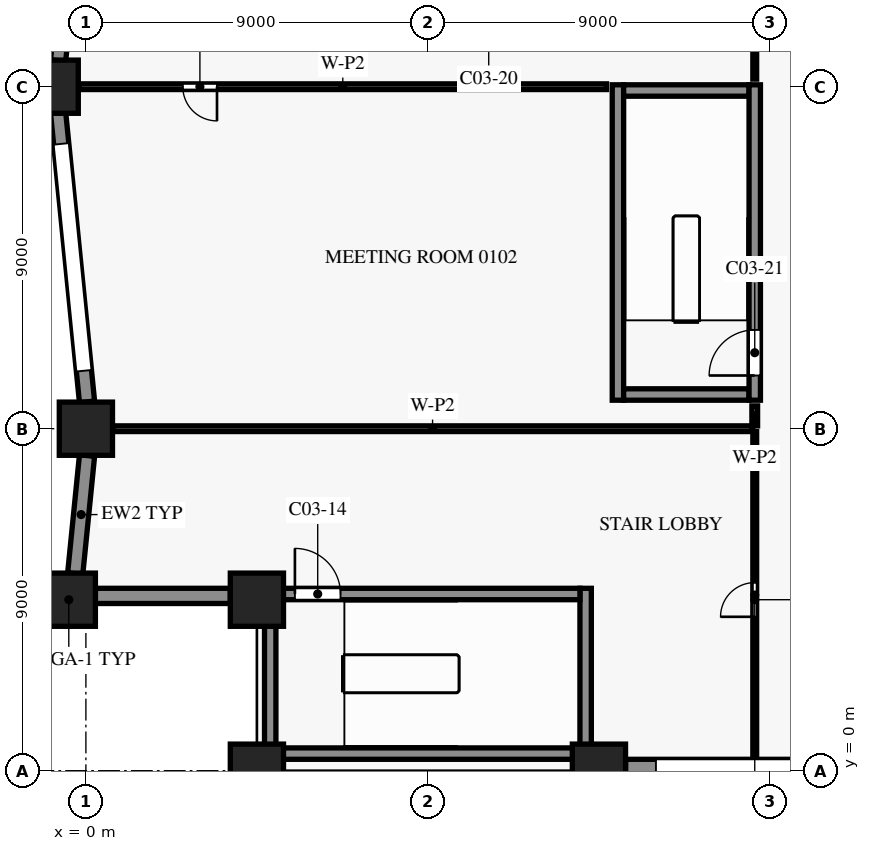
"""IFC4 building model, lengths in metres.
Left out: names, types, materials, properties, quantities, classifications, styles, units other than length and angle.
Written with IfcOpenShell. Run it as: python <this file> out.ifc"""

import sys

from ifc_helpers import new_model, si_unit, direction, frame, frame_2d, origin, origin_2d, place, context, subcontext, project, spatial, rectangle, extrude, element, fill, save


model = new_model("IFC4")
c1 = context("Model", 3, precision=1e-05, world=origin(), true_north=direction((0.0, 1.0)))
c2 = subcontext(c1, "Body", "Model", "MODEL_VIEW")
j1 = project(units=[si_unit("LENGTHUNIT", "METRE"), si_unit("PLANEANGLEUNIT", "RADIAN")], contexts=[c1])
p1 = place(None, origin())
s1 = spatial("IfcSite", under=j1, at=p1, CompositionType="ELEMENT")
p2 = place(p1, origin())
s2 = spatial("IfcBuilding", under=s1, at=p2, CompositionType="ELEMENT")
p3 = place(p2, frame((0.0, 0.0, 7.5)))
s3 = spatial("IfcBuildingStorey", under=s2, at=p3, CompositionType="ELEMENT", Elevation=7.5)
for number, where, z_axis, x_axis in (
    (1, (4.5, 0.0, 0.0), (0.0, 0.0, 1.0), (1.0, 0.0, 0.0)),
    (2, (13.5, 0.0, 0.0), (0.0, 0.0, 1.0), (1.0, 0.0, 0.0)),
    (3, (-0.9, 18.0, 0.0), (0.0, 0.0, 1.0), (1.0, 0.0, 0.0)),
    (4, (0.0, 9.0, 0.0), (0.0, 0.0, 1.0), (1.0, 0.0, 0.0)),
    (5, (-0.45, 4.5, 0.0), (0.0, 0.0, 1.0), (1.0, 0.0, 0.0)),
    (6, (4.5, 4.5, 0.0), (0.0, 0.0, 1.0), (1.0, 0.0, 0.0)),
):
    element("IfcColumn", number, at=place(p3, frame(where, z_axis=z_axis, x_axis=x_axis)), inside=s3, PredefinedType="COLUMN", context=c2, shape_type="SweptSolid", body=[
        extrude(rectangle(XDim=1.4, YDim=1.4, at=origin_2d()), origin(), (0.0, 0.0, 1.0), 7.0),
    ])
p4 = place(p3, frame((21.8, 0.1, 0.0), z_axis=(0.0, 0.0, 1.0), x_axis=(-1.0, 0.0, 0.0)))
e7 = element("IfcWall", 7, at=p4, inside=s3, PredefinedType="SOLIDWALL", context=c2, shape_type="SweptSolid", body=[
    extrude(rectangle(XDim=7.6, YDim=0.4, at=frame_2d((3.8, 0.0))), origin(), (0.0, 0.0, 1.0), 6.1),
])
p5 = place(p4, frame((0.8, 0.0, 0.9)))
e8 = element("IfcOpeningElement", 8, at=p5, cuts=e7, PredefinedType="OPENING", context=c2, shape_type="SweptSolid", body=[
    extrude(rectangle(XDim=6.0, YDim=1.8, at=frame_2d((3.0, 0.9))), frame((0.0, 0.21, 0.0), z_axis=(0.0, -1.0, 0.0), x_axis=(1.0, 0.0, 0.0)), (0.0, 0.0, 1.0), 0.42),
])
p6 = place(p3, frame((-0.731, 18.687, 0.0), z_axis=(0.0, 0.0, 1.0), x_axis=(0.099478423711, 0.995039719416, 0.0)))
e9 = element("IfcWall", 9, at=p6, inside=s3, PredefinedType="SOLIDWALL", context=c2, shape_type="SweptSolid", body=[
    extrude(rectangle(XDim=7.645, YDim=0.4, at=frame_2d((3.822, 0.0))), origin(), (0.0, 0.0, 1.0), 6.1),
])
p7 = place(p6, frame((0.823, 0.0, 0.9)))
e10 = element("IfcOpeningElement", 10, at=p7, cuts=e9, PredefinedType="OPENING", context=c2, shape_type="SweptSolid", body=[
    extrude(rectangle(XDim=6.0, YDim=1.8, at=frame_2d((3.0, 0.9))), frame((0.0, 0.21, 0.0), z_axis=(0.0, -1.0, 0.0), x_axis=(1.0, 0.0, 0.0)), (0.0, 0.0, 1.0), 0.42),
])
p8 = place(p3, frame((0.03, 9.707, 0.0), z_axis=(0.0, 0.0, 1.0), x_axis=(-0.099478423711, 0.995039719416, 0.0)))
e11 = element("IfcWall", 11, at=p8, inside=s3, PredefinedType="SOLIDWALL", context=c2, shape_type="SweptSolid", body=[
    extrude(rectangle(XDim=7.645, YDim=0.4, at=frame_2d((3.822, 0.0))), origin(), (0.0, 0.0, 1.0), 6.1),
])
p9 = place(p8, frame((0.823, 0.0, 0.9)))
e12 = element("IfcOpeningElement", 12, at=p9, cuts=e11, PredefinedType="OPENING", context=c2, shape_type="SweptSolid", body=[
    extrude(rectangle(XDim=6.0, YDim=1.8, at=frame_2d((3.0, 0.9))), frame((0.0, 0.21, 0.0), z_axis=(0.0, -1.0, 0.0), x_axis=(1.0, 0.0, 0.0)), (0.0, 0.0, 1.0), 0.42),
])
p10 = place(p3, frame((-0.281, 5.187, 0.0), z_axis=(0.0, 0.0, 1.0), x_axis=(0.099457269599, 0.995041834057, 0.0)))
e13 = element("IfcWall", 13, at=p10, inside=s3, PredefinedType="SOLIDWALL", context=c2, shape_type="SweptSolid", body=[
    extrude(rectangle(XDim=3.122, YDim=0.4, at=frame_2d((1.561, 0.0))), origin(), (0.0, 0.0, 1.0), 6.1),
])
p11 = place(p3, frame((3.8, 4.6, 0.0), z_axis=(0.0, 0.0, 1.0), x_axis=(-1.0, 0.0, 0.0)))
e14 = element("IfcWall", 14, at=p11, inside=s3, PredefinedType="SOLIDWALL", context=c2, shape_type="SweptSolid", body=[
    extrude(rectangle(XDim=3.55, YDim=0.4, at=frame_2d((1.775, 0.0))), origin(), (0.0, 0.0, 1.0), 6.1),
])
p12 = place(p3, frame((5.0, 0.45, 0.0), z_axis=(0.0, 0.0, 1.0), x_axis=(1.0, 0.0, 0.0)))
e15 = element("IfcWall", 15, at=p12, inside=s3, PredefinedType="SHEAR", context=c2, shape_type="SweptSolid", body=[
    extrude(rectangle(XDim=8.0, YDim=0.3, at=frame_2d((4.0, 0.0))), origin(), (0.0, 0.0, 1.0), 6.7),
])
p13 = place(p3, frame((5.0, 4.65, 0.0), z_axis=(0.0, 0.0, 1.0), x_axis=(1.0, 0.0, 0.0)))
e16 = element("IfcWall", 16, at=p13, inside=s3, PredefinedType="SHEAR", context=c2, shape_type="SweptSolid", body=[
    extrude(rectangle(XDim=8.0, YDim=0.3, at=frame_2d((4.0, 0.0))), origin(), (0.0, 0.0, 1.0), 6.7),
])
p14 = place(p13, frame((0.5, 0.0, 0.0)))
e17 = element("IfcOpeningElement", 17, at=p14, cuts=e16, PredefinedType="OPENING", context=c2, shape_type="SweptSolid", body=[
    extrude(rectangle(XDim=1.2, YDim=2.2, at=frame_2d((0.6, 1.1))), frame((0.0, 0.16, 0.0), z_axis=(0.0, -1.0, 0.0), x_axis=(1.0, 0.0, 0.0)), (0.0, 0.0, 1.0), 0.32),
])
for number, where, z_axis, x_axis in (
    (18, (14.15, 9.9, 0.0), (0.0, 0.0, 1.0), (1.0, 0.0, 0.0)),
    (19, (14.15, 17.9, 0.0), (0.0, 0.0, 1.0), (1.0, 0.0, 0.0)),
):
    element("IfcWall", number, at=place(p3, frame(where, z_axis=z_axis, x_axis=x_axis)), inside=s3, PredefinedType="SHEAR", context=c2, shape_type="SweptSolid", body=[
        extrude(rectangle(XDim=3.3, YDim=0.3, at=frame_2d((1.65, 0.0))), origin(), (0.0, 0.0, 1.0), 6.7),
    ])
for number, where, z_axis, x_axis in (
    (20, (4.85, 0.3, 0.0), (0.0, 0.0, 1.0), (0.0, 1.0, 0.0)),
    (21, (13.15, 0.3, 0.0), (0.0, 0.0, 1.0), (0.0, 1.0, 0.0)),
):
    element("IfcWall", number, at=place(p3, frame(where, z_axis=z_axis, x_axis=x_axis)), inside=s3, PredefinedType="SHEAR", context=c2, shape_type="SweptSolid", body=[
        extrude(rectangle(XDim=4.5, YDim=0.3, at=frame_2d((2.25, 0.0))), origin(), (0.0, 0.0, 1.0), 6.7),
    ])
p15 = place(p3, frame((14.0, 9.75, 0.0), z_axis=(0.0, 0.0, 1.0), x_axis=(0.0, 1.0, 0.0)))
e22 = element("IfcWall", 22, at=p15, inside=s3, PredefinedType="SHEAR", context=c2, shape_type="SweptSolid", body=[
    extrude(rectangle(XDim=8.3, YDim=0.3, at=frame_2d((4.15, 0.0))), origin(), (0.0, 0.0, 1.0), 6.7),
])
p16 = place(p3, frame((17.6, 9.75, 0.0), z_axis=(0.0, 0.0, 1.0), x_axis=(0.0, 1.0, 0.0)))
e23 = element("IfcWall", 23, at=p16, inside=s3, PredefinedType="SHEAR", context=c2, shape_type="SweptSolid", body=[
    extrude(rectangle(XDim=8.3, YDim=0.3, at=frame_2d((4.15, 0.0))), origin(), (0.0, 0.0, 1.0), 6.7),
])
p17 = place(p16, frame((0.65, 0.0, 0.0)))
e24 = element("IfcOpeningElement", 24, at=p17, cuts=e23, PredefinedType="OPENING", context=c2, shape_type="SweptSolid", body=[
    extrude(rectangle(XDim=1.2, YDim=2.2, at=frame_2d((0.6, 1.1))), frame((0.0, 0.16, 0.0), z_axis=(0.0, -1.0, 0.0), x_axis=(1.0, 0.0, 0.0)), (0.0, 0.0, 1.0), 0.32),
])
p18 = place(p3, frame((17.6, 0.32, 0.0), z_axis=(0.0, 0.0, 1.0), x_axis=(0.0, 1.0, 0.0)))
e25 = element("IfcWall", 25, at=p18, inside=s3, PredefinedType="PARTITIONING", context=c2, shape_type="SweptSolid", body=[
    extrude(rectangle(XDim=8.605, YDim=0.1, at=frame_2d((4.302, 0.0))), origin(), (0.0, 0.0, 1.0), 5.98),
])
p19 = place(p18, frame((3.73, 0.0, 0.0)))
e26 = element("IfcOpeningElement", 26, at=p19, cuts=e25, PredefinedType="OPENING", context=c2, shape_type="SweptSolid", body=[
    extrude(rectangle(XDim=0.9, YDim=2.1, at=frame_2d((0.45, 1.05))), frame((0.0, 0.06, 0.0), z_axis=(0.0, -1.0, 0.0), x_axis=(1.0, 0.0, 0.0)), (0.0, 0.0, 1.0), 0.12),
])
p20 = place(p3, frame((0.72, 9.0, 0.0), z_axis=(0.0, 0.0, 1.0), x_axis=(1.0, 0.0, 0.0)))
e27 = element("IfcWall", 27, at=p20, inside=s3, PredefinedType="PARTITIONING", context=c2, shape_type="SweptSolid", body=[
    extrude(rectangle(XDim=16.805, YDim=0.15, at=frame_2d((8.402, 0.0))), origin(), (0.0, 0.0, 1.0), 5.98),
])
p21 = place(p3, frame((17.6, 9.075, 0.0), z_axis=(0.0, 0.0, 1.0), x_axis=(0.0, 1.0, 0.0)))
e28 = element("IfcWall", 28, at=p21, inside=s3, PredefinedType="PARTITIONING", context=c2, shape_type="SweptSolid", body=[
    extrude(rectangle(XDim=0.525, YDim=0.15, at=frame_2d((0.263, 0.0))), origin(), (0.0, 0.0, 1.0), 5.98),
])
p22 = place(p3, frame((13.7, 18.0, 0.0), z_axis=(0.0, 0.0, 1.0), x_axis=(-1.0, 0.0, 0.0)))
e29 = element("IfcWall", 29, at=p22, inside=s3, PredefinedType="PARTITIONING", context=c2, shape_type="SweptSolid", body=[
    extrude(rectangle(XDim=13.88, YDim=0.15, at=frame_2d((6.94, 0.0))), origin(), (0.0, 0.0, 1.0), 5.98),
])
p23 = place(p22, frame((10.25, 0.0, 0.0)))
e30 = element("IfcOpeningElement", 30, at=p23, cuts=e29, PredefinedType="OPENING", context=c2, shape_type="SweptSolid", body=[
    extrude(rectangle(XDim=0.9, YDim=2.1, at=frame_2d((0.45, 1.05))), frame((0.0, 0.085, 0.0), z_axis=(0.0, -1.0, 0.0), x_axis=(1.0, 0.0, 0.0)), (0.0, 0.0, 1.0), 0.17),
])
p24 = place(p3, frame((17.6, 18.2, 0.0), z_axis=(0.0, 0.0, 1.0), x_axis=(0.0, 1.0, 0.0)))
e31 = element("IfcWall", 31, at=p24, inside=s3, PredefinedType="PARTITIONING", context=c2, shape_type="SweptSolid", body=[
    extrude(rectangle(XDim=8.75, YDim=0.1, at=frame_2d((4.375, 0.0))), origin(), (0.0, 0.0, 1.0), 5.98),
])
p25 = place(p24, frame((3.35, 0.0, 0.0)))
e32 = element("IfcOpeningElement", 32, at=p25, cuts=e31, PredefinedType="OPENING", context=c2, shape_type="SweptSolid", body=[
    extrude(rectangle(XDim=0.9, YDim=2.1, at=frame_2d((0.45, 1.05))), frame((0.0, 0.06, 0.0), z_axis=(0.0, -1.0, 0.0), x_axis=(1.0, 0.0, 0.0)), (0.0, 0.0, 1.0), 0.12),
])
p26 = place(p5, origin())
e33 = element("IfcWindow", 33, at=p26, inside=s3, PartitioningType="SINGLE_PANEL", PredefinedType="WINDOW", context=c2, shape_type="SweptSolid", body=[
    extrude(rectangle(XDim=6.0, YDim=1.8, at=frame_2d((3.0, 0.9))), frame((0.0, 0.03, 0.0), z_axis=(0.0, -1.0, 0.0), x_axis=(1.0, 0.0, 0.0)), (0.0, 0.0, 1.0), 0.06),
])
fill(e8, e33)
p27 = place(p9, origin())
e34 = element("IfcWindow", 34, at=p27, inside=s3, PartitioningType="SINGLE_PANEL", PredefinedType="WINDOW", context=c2, shape_type="SweptSolid", body=[
    extrude(rectangle(XDim=6.0, YDim=1.8, at=frame_2d((3.0, 0.9))), frame((0.0, 0.03, 0.0), z_axis=(0.0, -1.0, 0.0), x_axis=(1.0, 0.0, 0.0)), (0.0, 0.0, 1.0), 0.06),
])
fill(e12, e34)
p28 = place(p14, origin())
e35 = element("IfcDoor", 35, at=p28, inside=s3, OperationType="SINGLE_SWING_LEFT", PredefinedType="DOOR", context=c2, shape_type="SweptSolid", body=[
    extrude(rectangle(XDim=1.2, YDim=2.2, at=frame_2d((0.6, 1.1))), frame((0.0, 0.025, 0.0), z_axis=(0.0, -1.0, 0.0), x_axis=(1.0, 0.0, 0.0)), (0.0, 0.0, 1.0), 0.05),
])
fill(e17, e35)
p29 = place(p17, origin())
e36 = element("IfcDoor", 36, at=p29, inside=s3, OperationType="SINGLE_SWING_LEFT", PredefinedType="DOOR", context=c2, shape_type="SweptSolid", body=[
    extrude(rectangle(XDim=1.2, YDim=2.2, at=frame_2d((0.6, 1.1))), frame((0.0, 0.025, 0.0), z_axis=(0.0, -1.0, 0.0), x_axis=(1.0, 0.0, 0.0)), (0.0, 0.0, 1.0), 0.05),
])
fill(e24, e36)
p30 = place(p19, origin())
e37 = element("IfcDoor", 37, at=p30, inside=s3, OperationType="SINGLE_SWING_LEFT", PredefinedType="DOOR", context=c2, shape_type="SweptSolid", body=[
    extrude(rectangle(XDim=0.9, YDim=2.1, at=frame_2d((0.45, 1.05))), frame((0.0, 0.025, 0.0), z_axis=(0.0, -1.0, 0.0), x_axis=(1.0, 0.0, 0.0)), (0.0, 0.0, 1.0), 0.05),
])
fill(e26, e37)
p31 = place(p23, origin())
e38 = element("IfcDoor", 38, at=p31, inside=s3, OperationType="SINGLE_SWING_RIGHT", PredefinedType="DOOR", context=c2, shape_type="SweptSolid", body=[
    extrude(rectangle(XDim=0.9, YDim=2.1, at=frame_2d((0.45, 1.05))), frame((0.0, 0.025, 0.0), z_axis=(0.0, -1.0, 0.0), x_axis=(1.0, 0.0, 0.0)), (0.0, 0.0, 1.0), 0.05),
])
fill(e30, e38)
save(model, sys.argv[1])
